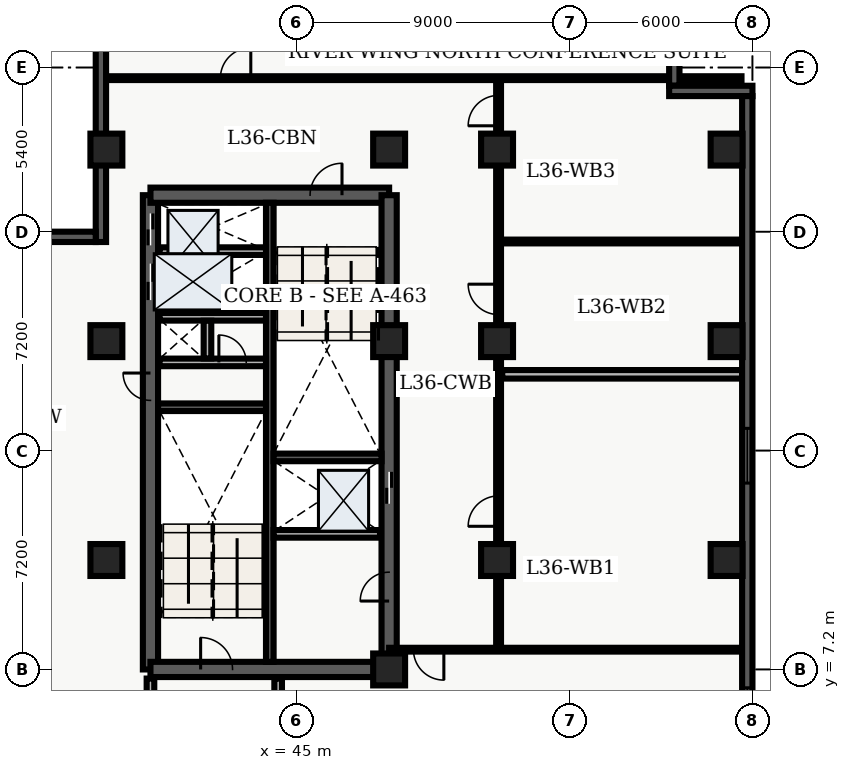
"""IFC4 building model, lengths in metres.
Left out: names, types, materials, properties, quantities, classifications, styles, units other than length and angle.
Written with IfcOpenShell. Run it as: python <this file> out.ifc"""

import sys

from ifc_helpers import new_model, entity, si_unit, converted_unit, direction, frame, origin_with_axes, origin_2d_with_axis, place, context, subcontext, project, spatial, polyline, rectangle, outline, extrude, element, fill, save


model = new_model("IFC4")
c1 = context("Model", 3, precision=1e-05, world=origin_with_axes(), true_north=direction((0.0, 1.0)))
c2 = subcontext(c1, "Body", "Model", "MODEL_VIEW")
j1 = project(units=[si_unit("LENGTHUNIT", "METRE"), converted_unit("PLANEANGLEUNIT", "DEGREE", entity("IfcPlaneAngleMeasure", 0.017), si_unit("PLANEANGLEUNIT", "RADIAN"), dimensions=[0, 0, 0, 0, 0, 0, 0])], contexts=[c1])
p1 = place(None, origin_with_axes())
s1 = spatial("IfcSite", under=j1, at=p1, CompositionType="ELEMENT")
p2 = place(p1, origin_with_axes())
s2 = spatial("IfcBuilding", under=s1, at=p2, CompositionType="ELEMENT")
p3 = place(p2, frame((0.0, 0.0, 148.5), z_axis=(0.0, 0.0, 1.0), x_axis=(1.0, 0.0, 0.0)))
s3 = spatial("IfcBuildingStorey", under=s2, at=p3, CompositionType="ELEMENT", Elevation=148.5)
p4 = place(p3, frame((40.2, 7.2, 0.0), z_axis=(0.0, 0.0, 1.0), x_axis=(0.0, 1.0, 0.0)))
e1 = element("IfcWall", 1, at=p4, inside=s3, PredefinedType="SHEAR", context=c2, shape_type="SweptSolid", body=[
    extrude(outline(polyline([(0.0, -0.25), (15.6, -0.25), (15.6, 0.25), (0.0, 0.25), (0.0, -0.25)])), origin_with_axes(), (0.0, 0.0, 1.0), 3.66),
])
p5 = place(p4, frame((14.475, 0.0, 0.0), z_axis=(0.0, 0.0, 1.0), x_axis=(1.0, 0.0, 0.0)))
e2 = element("IfcOpeningElement", 2, at=p5, cuts=e1, PredefinedType="OPENING", context=c2, shape_type="SweptSolid", body=[
    extrude(rectangle(XDim=1.05, YDim=0.52, at=origin_2d_with_axis()), origin_with_axes(), (0.0, 0.0, 1.0), 2.15),
])
p6 = place(p4, frame((12.75, 0.0, 0.0), z_axis=(0.0, 0.0, 1.0), x_axis=(1.0, 0.0, 0.0)))
e3 = element("IfcOpeningElement", 3, at=p6, cuts=e1, PredefinedType="OPENING", context=c2, shape_type="SweptSolid", body=[
    extrude(rectangle(XDim=1.2, YDim=0.52, at=origin_2d_with_axis()), origin_with_axes(), (0.0, 0.0, 1.0), 2.15),
])
p7 = place(p4, frame((9.3, 0.0, 0.0), z_axis=(0.0, 0.0, 1.0), x_axis=(1.0, 0.0, 0.0)))
e4 = element("IfcOpeningElement", 4, at=p7, cuts=e1, PredefinedType="OPENING", context=c2, shape_type="SweptSolid", body=[
    extrude(rectangle(XDim=0.9, YDim=0.52, at=origin_2d_with_axis()), origin_with_axes(), (0.0, 0.0, 1.0), 2.15),
])
p8 = place(p3, frame((40.2, 7.2, 0.0), z_axis=(0.0, 0.0, 1.0), x_axis=(1.0, 0.0, 0.0)))
e5 = element("IfcWall", 5, at=p8, inside=s3, PredefinedType="SHEAR", context=c2, shape_type="SweptSolid", body=[
    extrude(outline(polyline([(0.0, -0.25), (7.85, -0.25), (7.85, 0.25), (0.0, 0.25), (0.0, -0.25)])), origin_with_axes(), (0.0, 0.0, 1.0), 3.66),
])
p9 = place(p8, frame((2.175, 0.0, 0.0), z_axis=(0.0, 0.0, 1.0), x_axis=(1.0, 0.0, 0.0)))
e6 = element("IfcOpeningElement", 6, at=p9, cuts=e5, PredefinedType="OPENING", context=c2, shape_type="SweptSolid", body=[
    extrude(rectangle(XDim=1.05, YDim=0.52, at=origin_2d_with_axis()), origin_with_axes(), (0.0, 0.0, 1.0), 2.15),
])
p10 = place(p3, frame((40.2, 22.8, 0.0), z_axis=(0.0, 0.0, 1.0), x_axis=(1.0, 0.0, 0.0)))
e7 = element("IfcWall", 7, at=p10, inside=s3, PredefinedType="SHEAR", context=c2, shape_type="SweptSolid", body=[
    extrude(outline(polyline([(0.0, -0.25), (7.85, -0.25), (7.85, 0.25), (0.0, 0.25), (0.0, -0.25)])), origin_with_axes(), (0.0, 0.0, 1.0), 3.66),
])
p11 = place(p10, frame((5.775, 0.0, 0.0), z_axis=(0.0, 0.0, 1.0), x_axis=(1.0, 0.0, 0.0)))
e8 = element("IfcOpeningElement", 8, at=p11, cuts=e7, PredefinedType="OPENING", context=c2, shape_type="SweptSolid", body=[
    extrude(rectangle(XDim=1.05, YDim=0.52, at=origin_2d_with_axis()), origin_with_axes(), (0.0, 0.0, 1.0), 2.15),
])
p12 = place(p3, frame((48.05, 7.2, 0.0), z_axis=(0.0, 0.0, 1.0), x_axis=(0.0, 1.0, 0.0)))
e9 = element("IfcWall", 9, at=p12, inside=s3, PredefinedType="SHEAR", context=c2, shape_type="SweptSolid", body=[
    extrude(outline(polyline([(0.0, -0.25), (15.6, -0.25), (15.6, 0.25), (0.0, 0.25), (0.0, -0.25)])), origin_with_axes(), (0.0, 0.0, 1.0), 3.66),
])
p13 = place(p12, frame((5.975, 0.0, 0.0), z_axis=(0.0, 0.0, 1.0), x_axis=(1.0, 0.0, 0.0)))
e10 = element("IfcOpeningElement", 10, at=p13, cuts=e9, PredefinedType="OPENING", context=c2, shape_type="SweptSolid", body=[
    extrude(rectangle(XDim=1.05, YDim=0.52, at=origin_2d_with_axis()), origin_with_axes(), (0.0, 0.0, 1.0), 2.15),
])
p14 = place(p12, frame((2.725, 0.0, 0.0), z_axis=(0.0, 0.0, 1.0), x_axis=(1.0, 0.0, 0.0)))
e11 = element("IfcOpeningElement", 11, at=p14, cuts=e9, PredefinedType="OPENING", context=c2, shape_type="SweptSolid", body=[
    extrude(rectangle(XDim=0.95, YDim=0.52, at=origin_2d_with_axis()), origin_with_axes(), (0.0, 0.0, 1.0), 2.15),
])
p15 = place(p3, frame((44.125, 7.45, 0.0), z_axis=(0.0, 0.0, 1.0), x_axis=(0.0, 1.0, 0.0)))
e12 = element("IfcWall", 12, at=p15, inside=s3, PredefinedType="SHEAR", context=c2, shape_type="SweptSolid", body=[
    extrude(outline(polyline([(0.0, -0.125), (15.1, -0.125), (15.1, 0.125), (0.0, 0.125), (0.0, -0.125)])), origin_with_axes(), (0.0, 0.0, 1.0), 3.66),
])
for number, where, z_axis, x_axis in (
    (13, (40.45, 15.825, 0.0), (0.0, 0.0, 1.0), (1.0, 0.0, 0.0)),
    (14, (44.25, 14.175, 0.0), (0.0, 0.0, 1.0), (1.0, 0.0, 0.0)),
):
    element("IfcWall", number, at=place(p3, frame(where, z_axis=z_axis, x_axis=x_axis)), inside=s3, PredefinedType="SHEAR", context=c2, shape_type="SweptSolid", body=[
        extrude(outline(polyline([(0.0, -0.125), (3.55, -0.125), (3.55, 0.125), (0.0, 0.125), (0.0, -0.125)])), origin_with_axes(), (0.0, 0.0, 1.0), 3.66),
    ])
p16 = place(p3, frame((40.5, 17.3, 0.0), z_axis=(0.0, 0.0, 1.0), x_axis=(1.0, 0.0, 0.0)))
e15 = element("IfcWall", 15, at=p16, inside=s3, PredefinedType="SOLIDWALL", context=c2, shape_type="SweptSolid", body=[
    extrude(outline(polyline([(0.0, -0.125), (3.5, -0.125), (3.5, 0.125), (0.0, 0.125), (0.0, -0.125)])), origin_with_axes(), (0.0, 0.0, 1.0), 2.7),
])
p17 = place(p16, frame((2.4, 0.0, 0.0), z_axis=(0.0, 0.0, 1.0), x_axis=(1.0, 0.0, 0.0)))
e16 = element("IfcOpeningElement", 16, at=p17, cuts=e15, PredefinedType="OPENING", context=c2, shape_type="SweptSolid", body=[
    extrude(rectangle(XDim=0.9, YDim=0.27, at=origin_2d_with_axis()), origin_with_axes(), (0.0, 0.0, 1.0), 2.15),
])
p18 = place(p3, frame((40.5, 18.8, 0.0), z_axis=(0.0, 0.0, 1.0), x_axis=(1.0, 0.0, 0.0)))
e17 = element("IfcWall", 17, at=p18, inside=s3, PredefinedType="SOLIDWALL", context=c2, shape_type="SweptSolid", body=[
    extrude(outline(polyline([(0.0, -0.125), (3.5, -0.125), (3.5, 0.125), (0.0, 0.125), (0.0, -0.125)])), origin_with_axes(), (0.0, 0.0, 1.0), 2.7),
])
p19 = place(p3, frame((42.075, 17.43, 0.0), z_axis=(0.0, 0.0, 1.0), x_axis=(0.0, 1.0, 0.0)))
e18 = element("IfcWall", 18, at=p19, inside=s3, PredefinedType="SOLIDWALL", context=c2, shape_type="SweptSolid", body=[
    extrude(outline(polyline([(0.0, -0.125), (1.24, -0.125), (1.24, 0.125), (0.0, 0.125), (0.0, -0.125)])), origin_with_axes(), (0.0, 0.0, 1.0), 2.7),
])
p20 = place(p3, frame((40.2, 3.1, 0.0), z_axis=(0.0, 0.0, 1.0), x_axis=(0.0, 1.0, 0.0)))
e19 = element("IfcWall", 19, at=p20, inside=s3, PredefinedType="SOLIDWALL", context=c2, shape_type="SweptSolid", body=[
    extrude(outline(polyline([(0.0, -0.125), (3.8, -0.125), (3.8, 0.125), (0.0, 0.125), (0.0, -0.125)])), origin_with_axes(), (0.0, 0.0, 1.0), 2.7),
])
p21 = place(p20, frame((2.075, 0.0, 0.0), z_axis=(0.0, 0.0, 1.0), x_axis=(1.0, 0.0, 0.0)))
e20 = element("IfcOpeningElement", 20, at=p21, cuts=e19, PredefinedType="OPENING", context=c2, shape_type="SweptSolid", body=[
    extrude(rectangle(XDim=1.05, YDim=0.27, at=origin_2d_with_axis()), origin_with_axes(), (0.0, 0.0, 1.0), 2.15),
])
p22 = place(p3, frame((44.4, 3.1, 0.0), z_axis=(0.0, 0.0, 1.0), x_axis=(0.0, 1.0, 0.0)))
e21 = element("IfcWall", 21, at=p22, inside=s3, PredefinedType="SOLIDWALL", context=c2, shape_type="SweptSolid", body=[
    extrude(outline(polyline([(0.0, -0.125), (3.8, -0.125), (3.8, 0.125), (0.0, 0.125), (0.0, -0.125)])), origin_with_axes(), (0.0, 0.0, 1.0), 2.7),
])
for number, where, z_axis, x_axis in (
    (22, (38.75, 10.8, 0.0), (0.0, 0.0, 1.0), (1.0, 0.0, 0.0)),
    (23, (38.75, 18.0, 0.0), (0.0, 0.0, 1.0), (1.0, 0.0, 0.0)),
    (24, (38.75, 24.3, 0.0), (0.0, 0.0, 1.0), (1.0, 0.0, 0.0)),
    (25, (48.05, 7.2, 0.0), (0.0, 0.0, 1.0), (1.0, 0.0, 0.0)),
    (26, (48.05, 18.0, 0.0), (0.0, 0.0, 1.0), (1.0, 0.0, 0.0)),
    (27, (48.05, 24.3, 0.0), (0.0, 0.0, 1.0), (1.0, 0.0, 0.0)),
    (28, (51.6, 10.8, 0.0), (0.0, 0.0, 1.0), (1.0, 0.0, 0.0)),
    (29, (51.6, 18.0, 0.0), (0.0, 0.0, 1.0), (1.0, 0.0, 0.0)),
    (30, (51.6, 24.3, 0.0), (0.0, 0.0, 1.0), (1.0, 0.0, 0.0)),
    (31, (59.15, 10.8, 0.0), (0.0, 0.0, 1.0), (1.0, 0.0, 0.0)),
    (32, (59.15, 18.0, 0.0), (0.0, 0.0, 1.0), (1.0, 0.0, 0.0)),
    (33, (59.15, 24.3, 0.0), (0.0, 0.0, 1.0), (1.0, 0.0, 0.0)),
):
    element("IfcColumn", number, at=place(p3, frame(where, z_axis=z_axis, x_axis=x_axis)), inside=s3, PredefinedType="COLUMN", context=c2, shape_type="SweptSolid", body=[
        extrude(rectangle(XDim=1.05, YDim=1.05, at=origin_2d_with_axis()), origin_with_axes(), (0.0, 0.0, 1.0), 3.9),
    ])
for number, where, z_axis, x_axis in (
    (34, (40.5, 20.96, 0.0), (0.0, 0.0, 1.0), (1.0, 0.0, 0.0)),
    (35, (44.25, 11.66, 0.0), (0.0, 0.0, 1.0), (1.0, 0.0, 0.0)),
):
    element("IfcWall", number, at=place(p3, frame(where, z_axis=z_axis, x_axis=x_axis)), inside=s3, PredefinedType="SOLIDWALL", context=c2, shape_type="SweptSolid", body=[
        extrude(outline(polyline([(0.0, -0.125), (3.5, -0.125), (3.5, 0.125), (0.0, 0.125), (0.0, -0.125)])), origin_with_axes(), (0.0, 0.0, 1.0), 2.7),
    ])
p23 = place(p3, frame((51.65, 7.85, 0.0), z_axis=(0.0, 0.0, 1.0), x_axis=(0.0, 1.0, 0.0)))
e36 = element("IfcWall", 36, at=p23, inside=s3, PredefinedType="PARTITIONING", context=c2, shape_type="SweptSolid", body=[
    extrude(outline(polyline([(0.0, -0.08), (18.8, -0.08), (18.8, 0.08), (0.0, 0.08), (0.0, -0.08)])), origin_with_axes(), (0.0, 0.0, 1.0), 2.7),
])
p24 = place(p23, frame((4.559, 0.0, 0.0), z_axis=(0.0, 0.0, 1.0), x_axis=(1.0, 0.0, 0.0)))
e37 = element("IfcOpeningElement", 37, at=p24, cuts=e36, PredefinedType="OPENING", context=c2, shape_type="SweptSolid", body=[
    extrude(rectangle(XDim=1.0, YDim=0.18, at=origin_2d_with_axis()), origin_with_axes(), (0.0, 0.0, 1.0), 2.15),
])
p25 = place(p23, frame((11.523, 0.0, 0.0), z_axis=(0.0, 0.0, 1.0), x_axis=(1.0, 0.0, 0.0)))
e38 = element("IfcOpeningElement", 38, at=p25, cuts=e36, PredefinedType="OPENING", context=c2, shape_type="SweptSolid", body=[
    extrude(rectangle(XDim=1.0, YDim=0.18, at=origin_2d_with_axis()), origin_with_axes(), (0.0, 0.0, 1.0), 2.15),
])
p26 = place(p23, frame((17.733, 0.0, 0.0), z_axis=(0.0, 0.0, 1.0), x_axis=(1.0, 0.0, 0.0)))
e39 = element("IfcOpeningElement", 39, at=p26, cuts=e36, PredefinedType="OPENING", context=c2, shape_type="SweptSolid", body=[
    extrude(rectangle(XDim=1.0, YDim=0.18, at=origin_2d_with_axis()), origin_with_axes(), (0.0, 0.0, 1.0), 2.15),
])
p27 = place(p3, frame((59.665, 7.85, 0.0), z_axis=(0.0, 0.0, 1.0), x_axis=(-1.0, 0.0, 0.0)))
e40 = element("IfcWall", 40, at=p27, inside=s3, PredefinedType="PARTITIONING", context=c2, shape_type="SweptSolid", body=[
    extrude(outline(polyline([(0.0, -0.062), (11.615, -0.062), (11.615, 0.062), (0.0, 0.062), (0.0, -0.062)])), origin_with_axes(), (0.0, 0.0, 1.0), 2.7),
])
p28 = place(p27, frame((10.315, 0.0, 0.0), z_axis=(0.0, 0.0, 1.0), x_axis=(1.0, 0.0, 0.0)))
e41 = element("IfcOpeningElement", 41, at=p28, cuts=e40, PredefinedType="OPENING", context=c2, shape_type="SweptSolid", body=[
    extrude(rectangle(XDim=1.0, YDim=0.145, at=origin_2d_with_axis()), origin_with_axes(), (0.0, 0.0, 1.0), 2.15),
])
p29 = place(p3, frame((38.735, 26.65, 0.0), z_axis=(0.0, 0.0, 1.0), x_axis=(1.0, 0.0, 0.0)))
e42 = element("IfcWall", 42, at=p29, inside=s3, PredefinedType="PARTITIONING", context=c2, shape_type="SweptSolid", body=[
    extrude(outline(polyline([(0.0, -0.062), (20.905, -0.062), (20.905, 0.062), (0.0, 0.062), (0.0, -0.062)])), origin_with_axes(), (0.0, 0.0, 1.0), 2.7),
])
p30 = place(p29, frame((4.265, 0.0, 0.0), z_axis=(0.0, 0.0, 1.0), x_axis=(1.0, 0.0, 0.0)))
e43 = element("IfcOpeningElement", 43, at=p30, cuts=e42, PredefinedType="OPENING", context=c2, shape_type="SweptSolid", body=[
    extrude(rectangle(XDim=1.0, YDim=0.145, at=origin_2d_with_axis()), origin_with_axes(), (0.0, 0.0, 1.0), 2.15),
])
p31 = place(p3, frame((51.77, 16.908, 0.0), z_axis=(0.0, 0.0, 1.0), x_axis=(1.0, 0.0, 0.0)))
e44 = element("IfcWall", 44, at=p31, inside=s3, PredefinedType="PARTITIONING", context=c2, shape_type="SweptSolid", body=[
    extrude(outline(polyline([(0.0, -0.14), (7.895, -0.14), (7.895, 0.14), (0.0, 0.14), (0.0, -0.14)])), origin_with_axes(), (0.0, 0.0, 1.0), 2.7),
])
p32 = place(p3, frame((51.77, 21.277, 0.0), z_axis=(0.0, 0.0, 1.0), x_axis=(1.0, 0.0, 0.0)))
e45 = element("IfcWall", 45, at=p32, inside=s3, PredefinedType="PARTITIONING", context=c2, shape_type="SweptSolid", body=[
    extrude(outline(polyline([(0.0, -0.062), (7.895, -0.062), (7.895, 0.062), (0.0, 0.062), (0.0, -0.062)])), origin_with_axes(), (0.0, 0.0, 1.0), 2.7),
])
p33 = place(p3, frame((38.57, 21.26, 0.0), z_axis=(0.0, 0.0, 1.0), x_axis=(0.0, 1.0, 0.0)))
e46 = element("IfcWall", 46, at=p33, inside=s3, PredefinedType="SOLIDWALL", context=c2, shape_type="SweptSolid", body=[
    extrude(outline(polyline([(0.0, -0.17), (7.54, -0.17), (7.54, 0.17), (0.0, 0.17), (0.0, -0.17)])), origin_with_axes(), (0.0, 0.0, 1.0), 3.66),
])
p34 = place(p3, frame((57.43, 28.46, 0.0), z_axis=(0.0, 0.0, 1.0), x_axis=(0.0, -1.0, 0.0)))
e47 = element("IfcWall", 47, at=p34, inside=s3, PredefinedType="SOLIDWALL", context=c2, shape_type="SweptSolid", body=[
    extrude(outline(polyline([(0.0, -0.17), (2.06, -0.17), (2.06, 0.17), (0.0, 0.17), (0.0, -0.17)])), origin_with_axes(), (0.0, 0.0, 1.0), 3.66),
])
p35 = place(p3, frame((57.26, 26.23, 0.0), z_axis=(0.0, 0.0, 1.0), x_axis=(1.0, 0.0, 0.0)))
e48 = element("IfcWall", 48, at=p35, inside=s3, PredefinedType="SOLIDWALL", context=c2, shape_type="SweptSolid", body=[
    extrude(outline(polyline([(0.0, -0.17), (2.74, -0.17), (2.74, 0.17), (0.0, 0.17), (0.0, -0.17)])), origin_with_axes(), (0.0, 0.0, 1.0), 3.66),
])
p36 = place(p3, frame((59.83, 26.06, 0.0), z_axis=(0.0, 0.0, 1.0), x_axis=(0.0, -1.0, 0.0)))
e49 = element("IfcWall", 49, at=p36, inside=s3, PredefinedType="SOLIDWALL", context=c2, shape_type="SweptSolid", body=[
    extrude(outline(polyline([(0.0, -0.17), (23.66, -0.17), (23.66, 0.17), (0.0, 0.17), (0.0, -0.17)])), origin_with_axes(), (0.0, 0.0, 1.0), 3.66),
])
p37 = place(p36, frame((11.83, 0.0, 0.45), z_axis=(0.0, 0.0, 1.0), x_axis=(1.0, 0.0, 0.0)))
e50 = element("IfcOpeningElement", 50, at=p37, cuts=e49, PredefinedType="OPENING", context=c2, shape_type="SweptSolid", body=[
    extrude(rectangle(XDim=1.8, YDim=0.36, at=origin_2d_with_axis()), origin_with_axes(), (0.0, 0.0, 1.0), 2.1),
])
p38 = place(p36, frame((20.364, 0.0, 0.45), z_axis=(0.0, 0.0, 1.0), x_axis=(1.0, 0.0, 0.0)))
e51 = element("IfcOpeningElement", 51, at=p38, cuts=e49, PredefinedType="OPENING", context=c2, shape_type="SweptSolid", body=[
    extrude(rectangle(XDim=1.8, YDim=0.36, at=origin_2d_with_axis()), origin_with_axes(), (0.0, 0.0, 1.0), 2.1),
])
p39 = place(p3, frame((22.101, 21.43, 0.0), z_axis=(0.0, 0.0, 1.0), x_axis=(1.0, 0.0, 0.0)))
e52 = element("IfcWall", 52, at=p39, inside=s3, PredefinedType="SOLIDWALL", context=c2, shape_type="SweptSolid", body=[
    extrude(outline(polyline([(0.0, -0.17), (16.299, -0.17), (16.299, 0.17), (0.0, 0.17), (0.0, -0.17)])), origin_with_axes(), (0.0, 0.0, 1.0), 3.66),
])
p40 = place(p39, frame((3.117, 0.0, 0.45), z_axis=(0.0, 0.0, 1.0), x_axis=(1.0, 0.0, 0.0)))
e53 = element("IfcOpeningElement", 53, at=p40, cuts=e52, PredefinedType="OPENING", context=c2, shape_type="SweptSolid", body=[
    extrude(rectangle(XDim=1.8, YDim=0.36, at=origin_2d_with_axis()), origin_with_axes(), (0.0, 0.0, 1.0), 2.1),
])
p41 = place(p39, frame((8.149, 0.0, 0.45), z_axis=(0.0, 0.0, 1.0), x_axis=(1.0, 0.0, 0.0)))
e54 = element("IfcOpeningElement", 54, at=p41, cuts=e52, PredefinedType="OPENING", context=c2, shape_type="SweptSolid", body=[
    extrude(rectangle(XDim=1.8, YDim=0.36, at=origin_2d_with_axis()), origin_with_axes(), (0.0, 0.0, 1.0), 2.1),
])
p42 = place(p39, frame((12.733, 0.0, 0.45), z_axis=(0.0, 0.0, 1.0), x_axis=(1.0, 0.0, 0.0)))
e55 = element("IfcOpeningElement", 55, at=p42, cuts=e52, PredefinedType="OPENING", context=c2, shape_type="SweptSolid", body=[
    extrude(rectangle(XDim=1.8, YDim=0.36, at=origin_2d_with_axis()), origin_with_axes(), (0.0, 0.0, 1.0), 2.1),
])
p43 = place(p12, frame((5.975, 0.0, 0.0), z_axis=(0.0, 0.0, 1.0), x_axis=(1.0, 0.0, 0.0)))
e56 = element("IfcDoor", 56, at=p43, inside=s3, OperationType="SLIDING_TO_LEFT", PredefinedType="DOOR", context=c2, shape_type="SweptSolid", body=[
    extrude(rectangle(XDim=1.05, YDim=0.09, at=origin_2d_with_axis()), origin_with_axes(), (0.0, 0.0, 1.0), 2.15),
])
fill(e10, e56)
p44 = place(p4, frame((14.475, 0.0, 0.0), z_axis=(0.0, 0.0, 1.0), x_axis=(1.0, 0.0, 0.0)))
e57 = element("IfcDoor", 57, at=p44, inside=s3, OperationType="SLIDING_TO_RIGHT", PredefinedType="DOOR", context=c2, shape_type="SweptSolid", body=[
    extrude(rectangle(XDim=1.05, YDim=0.09, at=origin_2d_with_axis()), origin_with_axes(), (0.0, 0.0, 1.0), 2.15),
])
fill(e2, e57)
p45 = place(p4, frame((12.75, 0.0, 0.0), z_axis=(0.0, 0.0, 1.0), x_axis=(1.0, 0.0, 0.0)))
e58 = element("IfcDoor", 58, at=p45, inside=s3, OperationType="DOUBLE_DOOR_SLIDING", PredefinedType="DOOR", context=c2, shape_type="SweptSolid", body=[
    extrude(rectangle(XDim=1.2, YDim=0.09, at=origin_2d_with_axis()), origin_with_axes(), (0.0, 0.0, 1.0), 2.15),
])
fill(e3, e58)
p46 = place(p4, frame((9.3, 0.0, 0.0), z_axis=(0.0, 0.0, 1.0), x_axis=(1.0, 0.0, 0.0)))
e59 = element("IfcDoor", 59, at=p46, inside=s3, OperationType="SINGLE_SWING_RIGHT", PredefinedType="DOOR", context=c2, shape_type="SweptSolid", body=[
    extrude(rectangle(XDim=0.9, YDim=0.09, at=origin_2d_with_axis()), origin_with_axes(), (0.0, 0.0, 1.0), 2.15),
])
fill(e4, e59)
p47 = place(p16, frame((2.4, 0.0, 0.0), z_axis=(0.0, 0.0, 1.0), x_axis=(1.0, 0.0, 0.0)))
e60 = element("IfcDoor", 60, at=p47, inside=s3, OperationType="SINGLE_SWING_LEFT", PredefinedType="DOOR", context=c2, shape_type="SweptSolid", body=[
    extrude(rectangle(XDim=0.9, YDim=0.09, at=origin_2d_with_axis()), origin_with_axes(), (0.0, 0.0, 1.0), 2.15),
])
fill(e16, e60)
p48 = place(p8, frame((2.175, 0.0, 0.0), z_axis=(0.0, 0.0, 1.0), x_axis=(1.0, 0.0, 0.0)))
e61 = element("IfcDoor", 61, at=p48, inside=s3, OperationType="SINGLE_SWING_LEFT", PredefinedType="DOOR", context=c2, shape_type="SweptSolid", body=[
    extrude(rectangle(XDim=1.05, YDim=0.09, at=origin_2d_with_axis()), origin_with_axes(), (0.0, 0.0, 1.0), 2.15),
])
fill(e6, e61)
p49 = place(p10, frame((5.775, 0.0, 0.0), z_axis=(0.0, 0.0, 1.0), x_axis=(1.0, 0.0, 0.0)))
e62 = element("IfcDoor", 62, at=p49, inside=s3, OperationType="SINGLE_SWING_RIGHT", PredefinedType="DOOR", context=c2, shape_type="SweptSolid", body=[
    extrude(rectangle(XDim=1.05, YDim=0.09, at=origin_2d_with_axis()), origin_with_axes(), (0.0, 0.0, 1.0), 2.15),
])
fill(e8, e62)
p50 = place(p12, frame((2.725, 0.0, 0.0), z_axis=(0.0, 0.0, 1.0), x_axis=(1.0, 0.0, 0.0)))
e63 = element("IfcDoor", 63, at=p50, inside=s3, OperationType="SINGLE_SWING_LEFT", PredefinedType="DOOR", context=c2, shape_type="SweptSolid", body=[
    extrude(rectangle(XDim=0.95, YDim=0.09, at=origin_2d_with_axis()), origin_with_axes(), (0.0, 0.0, 1.0), 2.15),
])
fill(e11, e63)
p51 = place(p27, frame((10.315, 0.0, 0.0), z_axis=(0.0, 0.0, 1.0), x_axis=(1.0, 0.0, 0.0)))
e64 = element("IfcDoor", 64, at=p51, inside=s3, OperationType="SINGLE_SWING_LEFT", PredefinedType="DOOR", context=c2, shape_type="SweptSolid", body=[
    extrude(rectangle(XDim=1.0, YDim=0.075, at=origin_2d_with_axis()), origin_with_axes(), (0.0, 0.0, 1.0), 2.15),
])
fill(e41, e64)
p52 = place(p29, frame((4.265, 0.0, 0.0), z_axis=(0.0, 0.0, 1.0), x_axis=(1.0, 0.0, 0.0)))
e65 = element("IfcDoor", 65, at=p52, inside=s3, OperationType="SINGLE_SWING_RIGHT", PredefinedType="DOOR", context=c2, shape_type="SweptSolid", body=[
    extrude(rectangle(XDim=1.0, YDim=0.075, at=origin_2d_with_axis()), origin_with_axes(), (0.0, 0.0, 1.0), 2.15),
])
fill(e43, e65)
p53 = place(p23, frame((4.559, 0.0, 0.0), z_axis=(0.0, 0.0, 1.0), x_axis=(1.0, 0.0, 0.0)))
e66 = element("IfcDoor", 66, at=p53, inside=s3, OperationType="SINGLE_SWING_LEFT", PredefinedType="DOOR", context=c2, shape_type="SweptSolid", body=[
    extrude(rectangle(XDim=1.0, YDim=0.09, at=origin_2d_with_axis()), origin_with_axes(), (0.0, 0.0, 1.0), 2.15),
])
fill(e37, e66)
p54 = place(p23, frame((11.523, 0.0, 0.0), z_axis=(0.0, 0.0, 1.0), x_axis=(1.0, 0.0, 0.0)))
e67 = element("IfcDoor", 67, at=p54, inside=s3, OperationType="SINGLE_SWING_RIGHT", PredefinedType="DOOR", context=c2, shape_type="SweptSolid", body=[
    extrude(rectangle(XDim=1.0, YDim=0.09, at=origin_2d_with_axis()), origin_with_axes(), (0.0, 0.0, 1.0), 2.15),
])
fill(e38, e67)
p55 = place(p23, frame((17.733, 0.0, 0.0), z_axis=(0.0, 0.0, 1.0), x_axis=(1.0, 0.0, 0.0)))
e68 = element("IfcDoor", 68, at=p55, inside=s3, OperationType="SINGLE_SWING_LEFT", PredefinedType="DOOR", context=c2, shape_type="SweptSolid", body=[
    extrude(rectangle(XDim=1.0, YDim=0.09, at=origin_2d_with_axis()), origin_with_axes(), (0.0, 0.0, 1.0), 2.15),
])
fill(e39, e68)
p56 = place(p36, frame((11.83, 0.0, 0.45), z_axis=(0.0, 0.0, 1.0), x_axis=(1.0, 0.0, 0.0)))
e69 = element("IfcWindow", 69, at=p56, inside=s3, PredefinedType="WINDOW", context=c2, shape_type="SweptSolid", body=[
    extrude(rectangle(XDim=1.8, YDim=0.09, at=origin_2d_with_axis()), origin_with_axes(), (0.0, 0.0, 1.0), 2.1),
])
fill(e50, e69)
p57 = place(p36, frame((20.364, 0.0, 0.45), z_axis=(0.0, 0.0, 1.0), x_axis=(1.0, 0.0, 0.0)))
e70 = element("IfcWindow", 70, at=p57, inside=s3, PredefinedType="WINDOW", context=c2, shape_type="SweptSolid", body=[
    extrude(rectangle(XDim=1.8, YDim=0.09, at=origin_2d_with_axis()), origin_with_axes(), (0.0, 0.0, 1.0), 2.1),
])
fill(e51, e70)
save(model, sys.argv[1])
